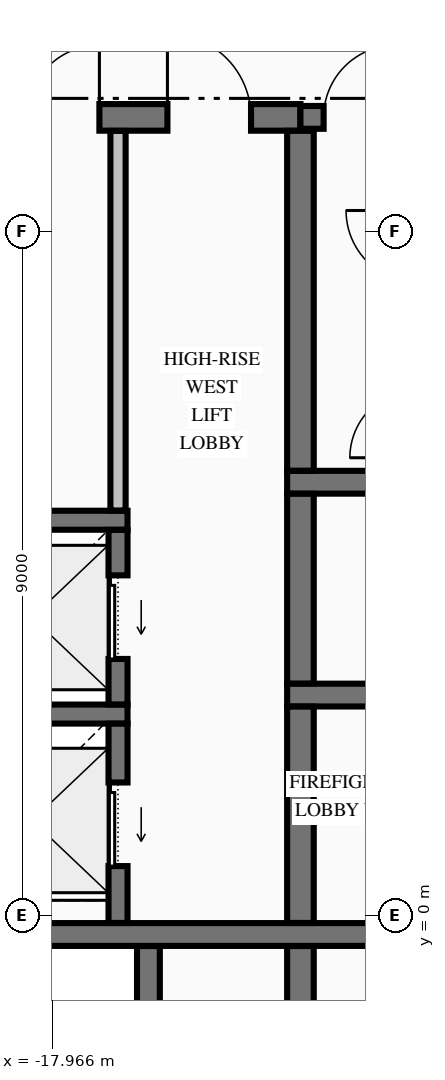
"""IFC4 building model, lengths in metres.
Left out: names, types, materials, properties, quantities, classifications, styles, units other than length and angle.
Written with IfcOpenShell. Run it as: python <this file> out.ifc"""

import sys

from ifc_helpers import new_model, si_unit, direction, frame, frame_2d, origin, place, context, subcontext, project, spatial, rectangle, extrude, element, fill, save


model = new_model("IFC4")
c1 = context("Model", 3, precision=1e-05, world=origin(), true_north=direction((0.0, 1.0)))
c2 = subcontext(c1, "Body", "Model", "MODEL_VIEW")
j1 = project(units=[si_unit("LENGTHUNIT", "METRE"), si_unit("PLANEANGLEUNIT", "RADIAN")], contexts=[c1])
p1 = place(None, origin())
s1 = spatial("IfcSite", under=j1, at=p1, CompositionType="ELEMENT")
p2 = place(p1, origin())
s2 = spatial("IfcBuilding", under=s1, at=p2, CompositionType="ELEMENT")
p3 = place(p2, frame((0.0, 0.0, 274.32)))
s3 = spatial("IfcBuildingStorey", under=s2, at=p3, CompositionType="ELEMENT", Elevation=274.32)
p4 = place(p3, frame((-19.646, -0.25, 0.0), z_axis=(0.0, 0.0, 1.0), x_axis=(1.0, 0.0, 0.0)))
e1 = element("IfcWall", 1, at=p4, inside=s3, PredefinedType="SHEAR", context=c2, shape_type="SweptSolid", body=[
    extrude(rectangle(XDim=8.292, YDim=0.3, at=frame_2d((4.146, 0.0))), origin(), (0.0, 0.0, 1.0), 3.315),
])
p5 = place(p4, frame((5.946, 0.0, 0.0)))
e2 = element("IfcOpeningElement", 2, at=p5, cuts=e1, PredefinedType="OPENING", context=c2, shape_type="SweptSolid", body=[
    extrude(rectangle(XDim=1.1, YDim=2.15, at=frame_2d((0.55, 1.075))), frame((0.0, 0.16, 0.0), z_axis=(0.0, -1.0, 0.0), x_axis=(1.0, 0.0, 0.0)), (0.0, 0.0, 1.0), 0.32),
])
p6 = place(p3, frame((-20.175, 2.65, 0.0), z_axis=(0.0, 0.0, 1.0), x_axis=(1.0, 0.0, 0.0)))
e3 = element("IfcWall", 3, at=p6, inside=s3, PredefinedType="SOLIDWALL", context=c2, shape_type="SweptSolid", body=[
    extrude(rectangle(XDim=3.2, YDim=0.25, at=frame_2d((1.6, 0.0))), origin(), (0.0, 0.0, 1.0), 3.315),
])
p7 = place(p3, frame((-14.875, 2.9, 0.0), z_axis=(0.0, 0.0, 1.0), x_axis=(1.0, 0.0, 0.0)))
e4 = element("IfcWall", 4, at=p7, inside=s3, PredefinedType="SHEAR", context=c2, shape_type="SweptSolid", body=[
    extrude(rectangle(XDim=4.025, YDim=0.3, at=frame_2d((2.012, 0.0))), origin(), (0.0, 0.0, 1.0), 3.315),
])
p8 = place(p7, frame((2.075, 0.0, 0.0)))
e5 = element("IfcOpeningElement", 5, at=p8, cuts=e4, PredefinedType="OPENING", context=c2, shape_type="SweptSolid", body=[
    extrude(rectangle(XDim=1.1, YDim=2.2, at=frame_2d((0.55, 1.1))), frame((0.0, 0.16, 0.0), z_axis=(0.0, -1.0, 0.0), x_axis=(1.0, 0.0, 0.0)), (0.0, 0.0, 1.0), 0.32),
])
p9 = place(p3, frame((-20.175, 5.2, 0.0), z_axis=(0.0, 0.0, 1.0), x_axis=(1.0, 0.0, 0.0)))
e6 = element("IfcWall", 6, at=p9, inside=s3, PredefinedType="SOLIDWALL", context=c2, shape_type="SweptSolid", body=[
    extrude(rectangle(XDim=3.2, YDim=0.25, at=frame_2d((1.6, 0.0))), origin(), (0.0, 0.0, 1.0), 3.315),
])
p10 = place(p3, frame((-14.875, 5.7, 0.0), z_axis=(0.0, 0.0, 1.0), x_axis=(1.0, 0.0, 0.0)))
e7 = element("IfcWall", 7, at=p10, inside=s3, PredefinedType="SHEAR", context=c2, shape_type="SweptSolid", body=[
    extrude(rectangle(XDim=4.025, YDim=0.3, at=frame_2d((2.012, 0.0))), origin(), (0.0, 0.0, 1.0), 3.315),
])
p11 = place(p3, frame((-19.646, 10.5, 0.0), z_axis=(0.0, 0.0, 1.0), x_axis=(1.0, 0.0, 0.0)))
e8 = element("IfcWall", 8, at=p11, inside=s3, PredefinedType="SHEAR", context=c2, shape_type="SweptSolid", body=[
    extrude(rectangle(XDim=4.946, YDim=0.35, at=frame_2d((2.473, 0.0))), origin(), (0.0, 0.0, 1.0), 3.315),
])
p12 = place(p11, frame((3.196, 0.0, 0.0)))
e9 = element("IfcOpeningElement", 9, at=p12, cuts=e8, PredefinedType="OPENING", context=c2, shape_type="SweptSolid", body=[
    extrude(rectangle(XDim=1.1, YDim=2.15, at=frame_2d((0.55, 1.075))), frame((0.0, 0.185, 0.0), z_axis=(0.0, -1.0, 0.0), x_axis=(1.0, 0.0, 0.0)), (0.0, 0.0, 1.0), 0.37),
])
p13 = place(p11, frame((1.351, 0.0, 0.0)))
e10 = element("IfcOpeningElement", 10, at=p13, cuts=e8, PredefinedType="OPENING", context=c2, shape_type="SweptSolid", body=[
    extrude(rectangle(XDim=0.95, YDim=2.15, at=frame_2d((0.475, 1.075))), frame((0.0, 0.185, 0.0), z_axis=(0.0, -1.0, 0.0), x_axis=(1.0, 0.0, 0.0)), (0.0, 0.0, 1.0), 0.37),
])
p14 = place(p3, frame((-14.7, 10.5, 0.0), z_axis=(0.0, 0.0, 1.0), x_axis=(1.0, 0.0, 0.0)))
e11 = element("IfcWall", 11, at=p14, inside=s3, PredefinedType="SHEAR", context=c2, shape_type="SweptSolid", body=[
    extrude(rectangle(XDim=3.346, YDim=0.3, at=frame_2d((1.673, 0.0))), origin(), (0.0, 0.0, 1.0), 3.315),
])
p15 = place(p14, frame((0.305, 0.0, 0.0)))
e12 = element("IfcOpeningElement", 12, at=p15, cuts=e11, PredefinedType="OPENING", context=c2, shape_type="SweptSolid", body=[
    extrude(rectangle(XDim=0.95, YDim=2.15, at=frame_2d((0.475, 1.075))), frame((0.0, 0.16, 0.0), z_axis=(0.0, -1.0, 0.0), x_axis=(1.0, 0.0, 0.0)), (0.0, 0.0, 1.0), 0.32),
])
p16 = place(p3, frame((-17.1, -0.098, 0.0), z_axis=(0.0, 0.0, 1.0), x_axis=(0.0, 1.0, 0.0)))
e13 = element("IfcWall", 13, at=p16, inside=s3, PredefinedType="SOLIDWALL", context=c2, shape_type="SweptSolid", body=[
    extrude(rectangle(XDim=2.621, YDim=0.25, at=frame_2d((1.311, 0.0))), origin(), (0.0, 0.0, 1.0), 3.315),
])
p17 = place(p16, frame((0.748, 0.0, 0.0)))
e14 = element("IfcOpeningElement", 14, at=p17, cuts=e13, PredefinedType="OPENING", context=c2, shape_type="SweptSolid", body=[
    extrude(rectangle(XDim=1.1, YDim=2.2, at=frame_2d((0.55, 1.1))), frame((0.0, 0.135, 0.0), z_axis=(0.0, -1.0, 0.0), x_axis=(1.0, 0.0, 0.0)), (0.0, 0.0, 1.0), 0.27),
])
p18 = place(p3, frame((-17.1, 2.777, 0.0), z_axis=(0.0, 0.0, 1.0), x_axis=(0.0, 1.0, 0.0)))
e15 = element("IfcWall", 15, at=p18, inside=s3, PredefinedType="SOLIDWALL", context=c2, shape_type="SweptSolid", body=[
    extrude(rectangle(XDim=2.296, YDim=0.25, at=frame_2d((1.148, 0.0))), origin(), (0.0, 0.0, 1.0), 3.315),
])
p19 = place(p18, frame((0.598, 0.0, 0.0)))
e16 = element("IfcOpeningElement", 16, at=p19, cuts=e15, PredefinedType="OPENING", context=c2, shape_type="SweptSolid", body=[
    extrude(rectangle(XDim=1.1, YDim=2.2, at=frame_2d((0.55, 1.1))), frame((0.0, 0.135, 0.0), z_axis=(0.0, -1.0, 0.0), x_axis=(1.0, 0.0, 0.0)), (0.0, 0.0, 1.0), 0.27),
])
p20 = place(p3, frame((-16.7, -9.773, 0.0), z_axis=(0.0, 0.0, 1.0), x_axis=(0.0, 1.0, 0.0)))
e17 = element("IfcWall", 17, at=p20, inside=s3, PredefinedType="SHEAR", context=c2, shape_type="SweptSolid", body=[
    extrude(rectangle(XDim=9.371, YDim=0.3, at=frame_2d((4.686, 0.0))), origin(), (0.0, 0.0, 1.0), 3.315),
])
p21 = place(p3, frame((-14.7, -9.773, 0.0), z_axis=(0.0, 0.0, 1.0), x_axis=(0.0, 1.0, 0.0)))
e18 = element("IfcWall", 18, at=p21, inside=s3, PredefinedType="SHEAR", context=c2, shape_type="SweptSolid", body=[
    extrude(rectangle(XDim=9.371, YDim=0.35, at=frame_2d((4.686, 0.0))), origin(), (0.0, 0.0, 1.0), 3.315),
])
p22 = place(p3, frame((-14.7, -0.098, 0.0), z_axis=(0.0, 0.0, 1.0), x_axis=(0.0, 1.0, 0.0)))
e19 = element("IfcWall", 19, at=p22, inside=s3, PredefinedType="SHEAR", context=c2, shape_type="SweptSolid", body=[
    extrude(rectangle(XDim=2.846, YDim=0.35, at=frame_2d((1.423, 0.0))), origin(), (0.0, 0.0, 1.0), 3.315),
])
p23 = place(p3, frame((-14.7, 3.052, 0.0), z_axis=(0.0, 0.0, 1.0), x_axis=(0.0, 1.0, 0.0)))
e20 = element("IfcWall", 20, at=p23, inside=s3, PredefinedType="SHEAR", context=c2, shape_type="SweptSolid", body=[
    extrude(rectangle(XDim=2.496, YDim=0.35, at=frame_2d((1.248, 0.0))), origin(), (0.0, 0.0, 1.0), 3.315),
])
p24 = place(p3, frame((-14.7, 5.852, 0.0), z_axis=(0.0, 0.0, 1.0), x_axis=(0.0, 1.0, 0.0)))
e21 = element("IfcWall", 21, at=p24, inside=s3, PredefinedType="SHEAR", context=c2, shape_type="SweptSolid", body=[
    extrude(rectangle(XDim=4.471, YDim=0.35, at=frame_2d((2.235, 0.0))), origin(), (0.0, 0.0, 1.0), 3.315),
])
p25 = place(p3, frame((-17.1, 5.328, 0.0), z_axis=(0.0, 0.0, 1.0), x_axis=(0.0, 1.0, 0.0)))
e22 = element("IfcWall", 22, at=p25, inside=s3, PredefinedType="PARTITIONING", context=c2, shape_type="SweptSolid", body=[
    extrude(rectangle(XDim=4.994, YDim=0.2, at=frame_2d((2.497, 0.0))), origin(), (0.0, 0.0, 1.0), 3.315),
])
p26 = place(p15, origin())
e23 = element("IfcDoor", 23, at=p26, inside=s3, OperationType="SINGLE_SWING_RIGHT", PredefinedType="DOOR", context=c2, shape_type="SweptSolid", body=[
    extrude(rectangle(XDim=0.95, YDim=2.15, at=frame_2d((0.475, 1.075))), frame((0.0, 0.025, 0.0), z_axis=(0.0, -1.0, 0.0), x_axis=(1.0, 0.0, 0.0)), (0.0, 0.0, 1.0), 0.05),
])
fill(e12, e23)
p27 = place(p17, origin())
e24 = element("IfcDoor", 24, at=p27, inside=s3, OperationType="SLIDING_TO_LEFT", PredefinedType="DOOR", context=c2, shape_type="SweptSolid", body=[
    extrude(rectangle(XDim=1.1, YDim=2.2, at=frame_2d((0.55, 1.1))), frame((0.0, 0.025, 0.0), z_axis=(0.0, -1.0, 0.0), x_axis=(1.0, 0.0, 0.0)), (0.0, 0.0, 1.0), 0.05),
])
fill(e14, e24)
p28 = place(p19, origin())
e25 = element("IfcDoor", 25, at=p28, inside=s3, OperationType="SLIDING_TO_LEFT", PredefinedType="DOOR", context=c2, shape_type="SweptSolid", body=[
    extrude(rectangle(XDim=1.1, YDim=2.2, at=frame_2d((0.55, 1.1))), frame((0.0, 0.025, 0.0), z_axis=(0.0, -1.0, 0.0), x_axis=(1.0, 0.0, 0.0)), (0.0, 0.0, 1.0), 0.05),
])
fill(e16, e25)
p29 = place(p12, origin())
e26 = element("IfcDoor", 26, at=p29, inside=s3, OperationType="SINGLE_SWING_LEFT", PredefinedType="DOOR", context=c2, shape_type="SweptSolid", body=[
    extrude(rectangle(XDim=1.1, YDim=2.15, at=frame_2d((0.55, 1.075))), frame((0.0, 0.025, 0.0), z_axis=(0.0, -1.0, 0.0), x_axis=(1.0, 0.0, 0.0)), (0.0, 0.0, 1.0), 0.05),
])
fill(e9, e26)
p30 = place(p13, origin())
e27 = element("IfcDoor", 27, at=p30, inside=s3, OperationType="SINGLE_SWING_RIGHT", PredefinedType="DOOR", context=c2, shape_type="SweptSolid", body=[
    extrude(rectangle(XDim=0.95, YDim=2.15, at=frame_2d((0.475, 1.075))), frame((0.0, 0.025, 0.0), z_axis=(0.0, -1.0, 0.0), x_axis=(1.0, 0.0, 0.0)), (0.0, 0.0, 1.0), 0.05),
])
fill(e10, e27)
save(model, sys.argv[1])
